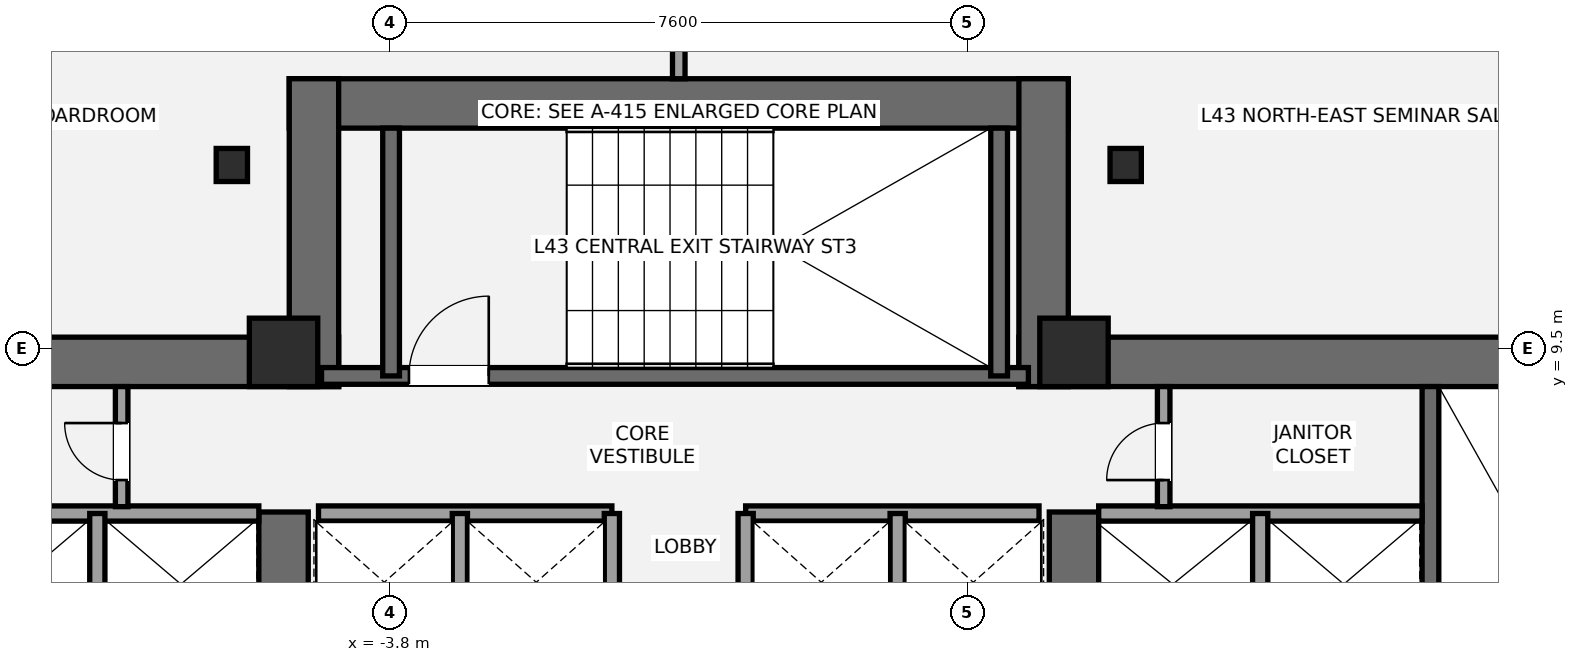
"""IFC4 building model, lengths in metres.
Left out: names, types, materials, properties, quantities, classifications, styles, units other than length and angle.
Written with IfcOpenShell. Run it as: python <this file> out.ifc"""

import sys

from ifc_helpers import new_model, si_unit, direction, frame, frame_2d, origin, origin_2d, place, context, subcontext, project, spatial, rectangle, i_section, extrude, element, fill, save


model = new_model("IFC4")
c1 = context("Model", 3, precision=1e-05, world=origin(), true_north=direction((0.0, 1.0)))
c2 = subcontext(c1, "Body", "Model", "MODEL_VIEW")
j1 = project(units=[si_unit("LENGTHUNIT", "METRE"), si_unit("PLANEANGLEUNIT", "RADIAN")], contexts=[c1])
p1 = place(None, origin())
s1 = spatial("IfcSite", under=j1, at=p1, CompositionType="ELEMENT")
p2 = place(p1, origin())
s2 = spatial("IfcBuilding", under=s1, at=p2, CompositionType="ELEMENT")
p3 = place(p2, frame((0.0, 0.0, 159.8)))
s3 = spatial("IfcBuildingStorey", under=s2, at=p3, CompositionType="ELEMENT", Elevation=159.8)
p4 = place(p3, frame((-13.8, 9.325, 0.0), z_axis=(0.0, 0.0, 1.0), x_axis=(1.0, 0.0, 0.0)))
e1 = element("IfcWall", 1, at=p4, inside=s3, PredefinedType="SHEAR", context=c2, shape_type="SweptSolid", body=[
    extrude(rectangle(XDim=9.325, YDim=0.65, at=frame_2d((4.663, 0.0))), origin(), (0.0, 0.0, 1.0), 3.2),
])
p5 = place(p3, frame((-5.2, 5.35, 0.0), z_axis=(0.0, 0.0, 1.0), x_axis=(0.0, 1.0, 0.0)))
e2 = element("IfcWall", 2, at=p5, inside=s3, PredefinedType="SHEAR", context=c2, shape_type="SweptSolid", body=[
    extrude(rectangle(XDim=2.0, YDim=0.65, at=frame_2d((1.0, 0.0))), origin(), (0.0, 0.0, 1.0), 3.2),
])
p6 = place(p3, frame((4.475, 9.325, 0.0), z_axis=(0.0, 0.0, 1.0), x_axis=(1.0, 0.0, 0.0)))
e3 = element("IfcWall", 3, at=p6, inside=s3, PredefinedType="SHEAR", context=c2, shape_type="SweptSolid", body=[
    extrude(rectangle(XDim=9.325, YDim=0.65, at=frame_2d((4.663, 0.0))), origin(), (0.0, 0.0, 1.0), 3.2),
])
p7 = place(p3, frame((5.2, 5.35, 0.0), z_axis=(0.0, 0.0, 1.0), x_axis=(0.0, 1.0, 0.0)))
e4 = element("IfcWall", 4, at=p7, inside=s3, PredefinedType="SHEAR", context=c2, shape_type="SweptSolid", body=[
    extrude(rectangle(XDim=2.0, YDim=0.65, at=frame_2d((1.0, 0.0))), origin(), (0.0, 0.0, 1.0), 3.2),
])
p8 = place(p3, frame((9.89, 1.85, 0.0), z_axis=(0.0, 0.0, 1.0), x_axis=(0.0, 1.0, 0.0)))
e5 = element("IfcWall", 5, at=p8, inside=s3, PredefinedType="SHEAR", context=c2, shape_type="SweptSolid", body=[
    extrude(rectangle(XDim=7.15, YDim=0.22, at=frame_2d((3.575, 0.0))), origin(), (0.0, 0.0, 1.0), 3.2),
])
p9 = place(p3, frame((-5.125, 12.725, 0.0), z_axis=(0.0, 0.0, 1.0), x_axis=(1.0, 0.0, 0.0)))
e6 = element("IfcWall", 6, at=p9, inside=s3, PredefinedType="SHEAR", context=c2, shape_type="SweptSolid", body=[
    extrude(rectangle(XDim=10.25, YDim=0.65, at=frame_2d((5.125, 0.0))), origin(), (0.0, 0.0, 1.0), 3.2),
])
for number, where, z_axis, x_axis in (
    (7, (-4.8, 9.0, 0.0), (0.0, 0.0, 1.0), (0.0, 1.0, 0.0)),
    (8, (4.8, 9.0, 0.0), (0.0, 0.0, 1.0), (0.0, 1.0, 0.0)),
):
    element("IfcWall", number, at=place(p3, frame(where, z_axis=z_axis, x_axis=x_axis)), inside=s3, PredefinedType="SHEAR", context=c2, shape_type="SweptSolid", body=[
        extrude(rectangle(XDim=4.05, YDim=0.65, at=frame_2d((2.025, 0.0))), origin(), (0.0, 0.0, 1.0), 3.2),
    ])
p10 = place(p3, frame((-4.7, 9.14, 0.0), z_axis=(0.0, 0.0, 1.0), x_axis=(1.0, 0.0, 0.0)))
e9 = element("IfcWall", 9, at=p10, inside=s3, PredefinedType="SHEAR", context=c2, shape_type="SweptSolid", body=[
    extrude(rectangle(XDim=9.3, YDim=0.22, at=frame_2d((4.65, 0.0))), origin(), (0.0, 0.0, 1.0), 3.2),
])
p11 = place(p10, frame((1.15, 0.0, 0.0)))
e10 = element("IfcOpeningElement", 10, at=p11, cuts=e9, PredefinedType="OPENING", context=c2, shape_type="SweptSolid", body=[
    extrude(rectangle(XDim=1.05, YDim=2.15, at=frame_2d((0.525, 1.075))), frame((0.0, 0.12, 0.0), z_axis=(0.0, -1.0, 0.0), x_axis=(1.0, 0.0, 0.0)), (0.0, 0.0, 1.0), 0.24),
])
for number, where, z_axis, x_axis in (
    (11, (-3.785, 9.14, 0.0), (0.0, 0.0, 1.0), (0.0, 1.0, 0.0)),
    (12, (4.215, 9.14, 0.0), (0.0, 0.0, 1.0), (0.0, 1.0, 0.0)),
):
    element("IfcWall", number, at=place(p3, frame(where, z_axis=z_axis, x_axis=x_axis)), inside=s3, PredefinedType="SHEAR", context=c2, shape_type="SweptSolid", body=[
        extrude(rectangle(XDim=3.26, YDim=0.22, at=frame_2d((1.63, 0.0))), origin(), (0.0, 0.0, 1.0), 3.2),
    ])
for number, where, z_axis, x_axis in (
    (13, (-5.2, 9.45, 0.0), (0.0, 0.0, 1.0), (1.0, 0.0, 0.0)),
    (14, (5.2, 9.45, 0.0), (0.0, 0.0, 1.0), (1.0, 0.0, 0.0)),
):
    element("IfcColumn", number, at=place(p3, frame(where, z_axis=z_axis, x_axis=x_axis)), inside=s3, PredefinedType="COLUMN", context=c2, shape_type="SweptSolid", body=[
        extrude(rectangle(XDim=0.9, YDim=0.9, at=origin_2d()), origin(), (0.0, 0.0, 1.0), 3.2),
    ])
for number, where, z_axis, x_axis in (
    (15, (5.88, 11.915, 0.0), (0.0, 0.0, 1.0), (1.0, 0.0, 0.0)),
    (16, (-5.88, 11.915, 0.0), (0.0, 0.0, 1.0), (1.0, 0.0, 0.0)),
):
    element("IfcColumn", number, at=place(p3, frame(where, z_axis=z_axis, x_axis=x_axis)), inside=s3, PredefinedType="COLUMN", context=c2, shape_type="SweptSolid", body=[
        extrude(i_section(OverallWidth=0.412, OverallDepth=0.435, WebThickness=0.036, FlangeThickness=0.057, at=origin_2d()), origin(), (0.0, 0.0, 1.0), 3.2),
    ])
p12 = place(p3, frame((-9.78, 7.33, 0.0), z_axis=(0.0, 0.0, 1.0), x_axis=(1.0, 0.0, 0.0)))
e17 = element("IfcWall", 17, at=p12, inside=s3, PredefinedType="SOLIDWALL", context=c2, shape_type="SweptSolid", body=[
    extrude(rectangle(XDim=4.255, YDim=0.2, at=frame_2d((2.127, 0.0))), origin(), (0.0, 0.0, 1.0), 3.02),
])
p13 = place(p3, frame((-7.65, 5.47, 0.0), z_axis=(0.0, 0.0, 1.0), x_axis=(0.0, 1.0, 0.0)))
e18 = element("IfcWall", 18, at=p13, inside=s3, PredefinedType="SOLIDWALL", context=c2, shape_type="SweptSolid", body=[
    extrude(rectangle(XDim=1.86, YDim=0.2, at=frame_2d((0.93, 0.0))), origin(), (0.0, 0.0, 1.0), 3.02),
])
p14 = place(p3, frame((5.525, 7.33, 0.0), z_axis=(0.0, 0.0, 1.0), x_axis=(1.0, 0.0, 0.0)))
e19 = element("IfcWall", 19, at=p14, inside=s3, PredefinedType="SOLIDWALL", context=c2, shape_type="SweptSolid", body=[
    extrude(rectangle(XDim=4.255, YDim=0.2, at=frame_2d((2.127, 0.0))), origin(), (0.0, 0.0, 1.0), 3.02),
])
p15 = place(p3, frame((7.65, 5.47, 0.0), z_axis=(0.0, 0.0, 1.0), x_axis=(0.0, 1.0, 0.0)))
e20 = element("IfcWall", 20, at=p15, inside=s3, PredefinedType="SOLIDWALL", context=c2, shape_type="SweptSolid", body=[
    extrude(rectangle(XDim=1.86, YDim=0.2, at=frame_2d((0.93, 0.0))), origin(), (0.0, 0.0, 1.0), 3.02),
])
for number, where, z_axis, x_axis in (
    (21, (-4.74, 7.33, 0.0), (0.0, 0.0, 1.0), (1.0, 0.0, 0.0)),
    (22, (0.88, 7.33, 0.0), (0.0, 0.0, 1.0), (1.0, 0.0, 0.0)),
):
    element("IfcWall", number, at=place(p3, frame(where, z_axis=z_axis, x_axis=x_axis)), inside=s3, PredefinedType="SOLIDWALL", context=c2, shape_type="SweptSolid", body=[
        extrude(rectangle(XDim=3.86, YDim=0.2, at=frame_2d((1.93, 0.0))), origin(), (0.0, 0.0, 1.0), 3.02),
    ])
for number, where, z_axis, x_axis in (
    (23, (-2.88, 5.52, 0.0), (0.0, 0.0, 1.0), (0.0, 1.0, 0.0)),
    (24, (2.88, 5.52, 0.0), (0.0, 0.0, 1.0), (0.0, 1.0, 0.0)),
    (25, (-0.88, 5.52, 0.0), (0.0, 0.0, 1.0), (0.0, 1.0, 0.0)),
    (26, (0.88, 5.52, 0.0), (0.0, 0.0, 1.0), (0.0, 1.0, 0.0)),
):
    element("IfcWall", number, at=place(p3, frame(where, z_axis=z_axis, x_axis=x_axis)), inside=s3, PredefinedType="SOLIDWALL", context=c2, shape_type="SweptSolid", body=[
        extrude(rectangle(XDim=1.81, YDim=0.2, at=frame_2d((0.905, 0.0))), origin(), (0.0, 0.0, 1.0), 3.02),
    ])
p16 = place(p3, frame((-7.33, 7.42, 0.0), z_axis=(0.0, 0.0, 1.0), x_axis=(0.0, 1.0, 0.0)))
e27 = element("IfcWall", 27, at=p16, inside=s3, PredefinedType="PARTITIONING", context=c2, shape_type="SweptSolid", body=[
    extrude(rectangle(XDim=1.58, YDim=0.165, at=frame_2d((0.79, 0.0))), origin(), (0.0, 0.0, 1.0), 3.02),
])
p17 = place(p16, frame((0.35, 0.0, 0.0)))
e28 = element("IfcOpeningElement", 28, at=p17, cuts=e27, PredefinedType="OPENING", context=c2, shape_type="SweptSolid", body=[
    extrude(rectangle(XDim=0.75, YDim=2.1, at=frame_2d((0.375, 1.05))), frame((0.0, 0.093, 0.0), z_axis=(0.0, -1.0, 0.0), x_axis=(1.0, 0.0, 0.0)), (0.0, 0.0, 1.0), 0.185),
])
p18 = place(p3, frame((6.38, 7.42, 0.0), z_axis=(0.0, 0.0, 1.0), x_axis=(0.0, 1.0, 0.0)))
e29 = element("IfcWall", 29, at=p18, inside=s3, PredefinedType="PARTITIONING", context=c2, shape_type="SweptSolid", body=[
    extrude(rectangle(XDim=1.58, YDim=0.165, at=frame_2d((0.79, 0.0))), origin(), (0.0, 0.0, 1.0), 3.02),
])
p19 = place(p18, frame((0.35, 0.0, 0.0)))
e30 = element("IfcOpeningElement", 30, at=p19, cuts=e29, PredefinedType="OPENING", context=c2, shape_type="SweptSolid", body=[
    extrude(rectangle(XDim=0.75, YDim=2.1, at=frame_2d((0.375, 1.05))), frame((0.0, 0.093, 0.0), z_axis=(0.0, -1.0, 0.0), x_axis=(1.0, 0.0, 0.0)), (0.0, 0.0, 1.0), 0.185),
])
p20 = place(p3, frame((0.0, 13.05, 0.0), z_axis=(0.0, 0.0, 1.0), x_axis=(0.0, 1.0, 0.0)))
e31 = element("IfcWall", 31, at=p20, inside=s3, PredefinedType="PARTITIONING", context=c2, shape_type="SweptSolid", body=[
    extrude(rectangle(XDim=3.29, YDim=0.165, at=frame_2d((1.645, 0.0))), origin(), (0.0, 0.0, 1.0), 3.02),
])
p21 = place(p11, origin())
e32 = element("IfcDoor", 32, at=p21, inside=s3, OperationType="SINGLE_SWING_RIGHT", PredefinedType="DOOR", context=c2, shape_type="SweptSolid", body=[
    extrude(rectangle(XDim=1.05, YDim=2.15, at=frame_2d((0.525, 1.075))), frame((0.0, 0.025, 0.0), z_axis=(0.0, -1.0, 0.0), x_axis=(1.0, 0.0, 0.0)), (0.0, 0.0, 1.0), 0.05),
])
fill(e10, e32)
p22 = place(p17, origin())
e33 = element("IfcDoor", 33, at=p22, inside=s3, OperationType="SINGLE_SWING_RIGHT", PredefinedType="DOOR", context=c2, shape_type="SweptSolid", body=[
    extrude(rectangle(XDim=0.75, YDim=2.1, at=frame_2d((0.375, 1.05))), frame((0.0, 0.025, 0.0), z_axis=(0.0, -1.0, 0.0), x_axis=(1.0, 0.0, 0.0)), (0.0, 0.0, 1.0), 0.05),
])
fill(e28, e33)
p23 = place(p19, origin())
e34 = element("IfcDoor", 34, at=p23, inside=s3, OperationType="SINGLE_SWING_LEFT", PredefinedType="DOOR", context=c2, shape_type="SweptSolid", body=[
    extrude(rectangle(XDim=0.75, YDim=2.1, at=frame_2d((0.375, 1.05))), frame((0.0, 0.025, 0.0), z_axis=(0.0, -1.0, 0.0), x_axis=(1.0, 0.0, 0.0)), (0.0, 0.0, 1.0), 0.05),
])
fill(e30, e34)
save(model, sys.argv[1])
